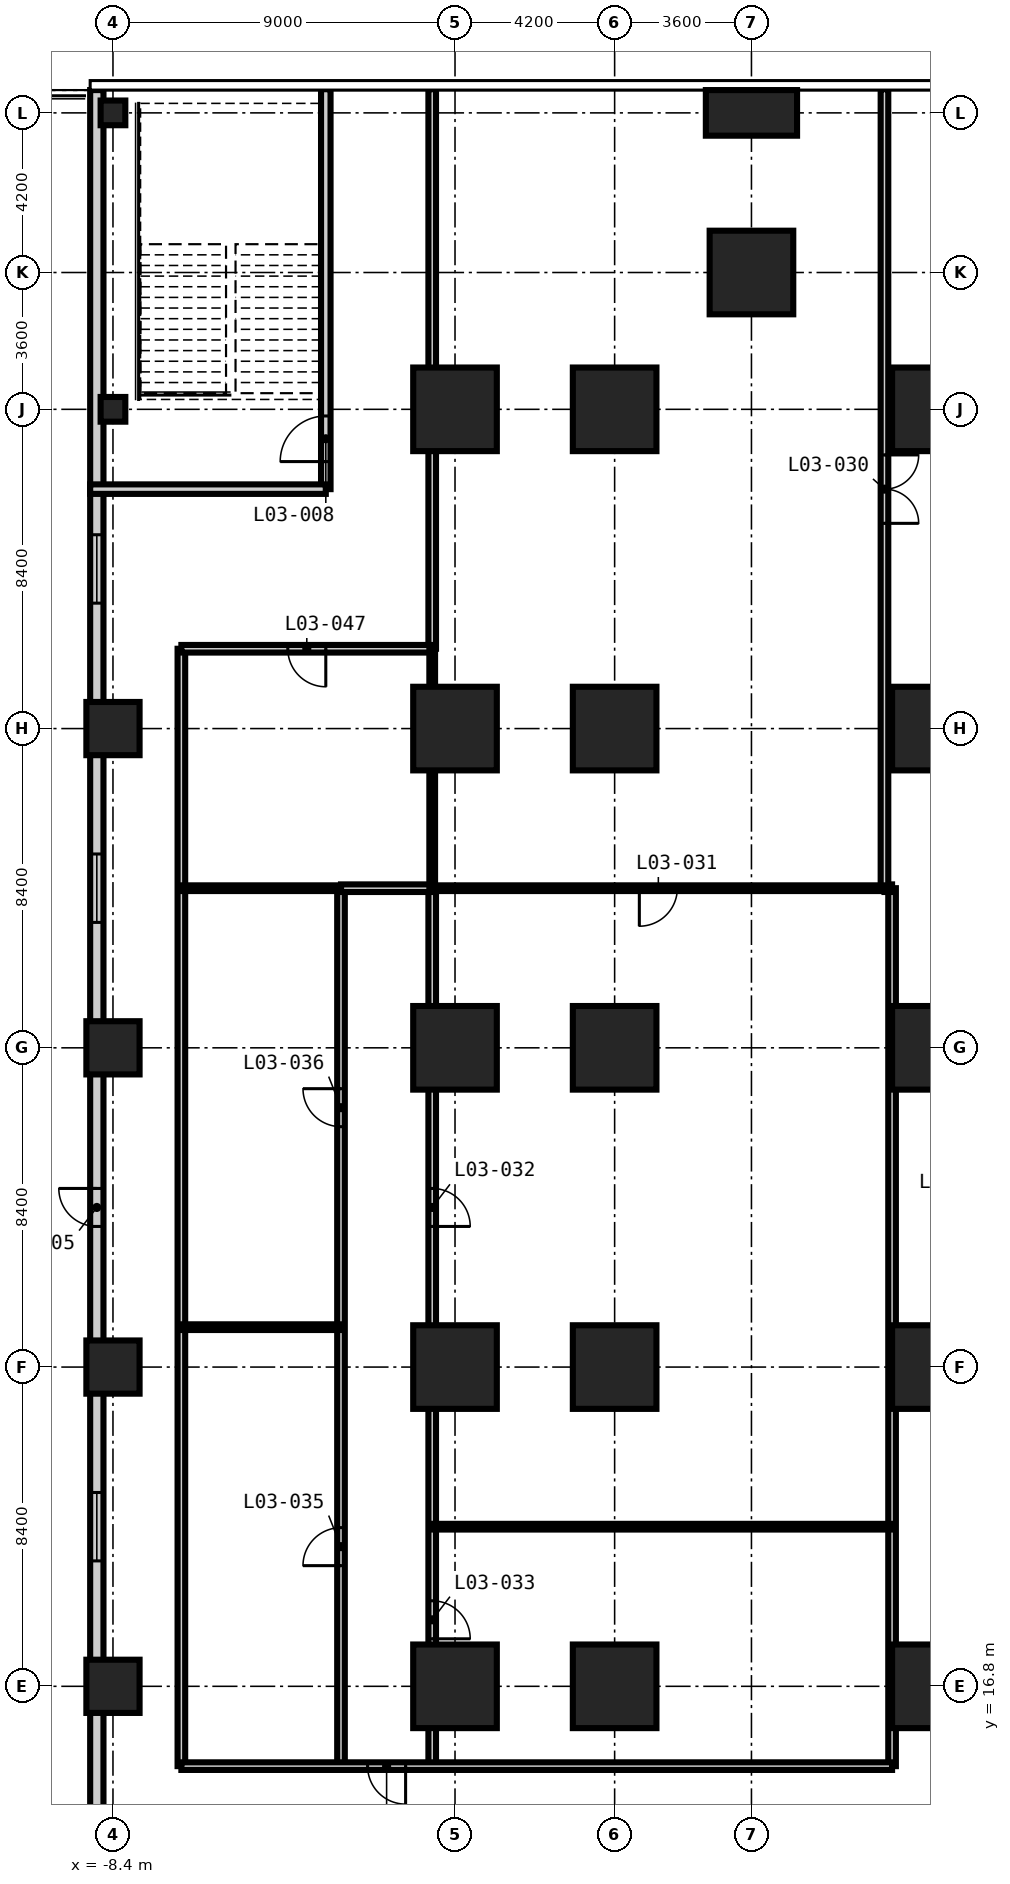
"""IFC4 building model, lengths in metres.
Left out: names, types, materials, properties, quantities, classifications, styles, units other than length and angle.
Written with IfcOpenShell. Run it as: python <this file> out.ifc"""

import sys

from ifc_helpers import new_model, si_unit, direction, frame, frame_2d, origin, origin_2d, place, context, subcontext, project, spatial, rectangle, extrude, element, fill, save


model = new_model("IFC4")
c1 = context("Model", 3, precision=1e-05, world=origin(), true_north=direction((0.0, 1.0)))
c2 = subcontext(c1, "Body", "Model", "MODEL_VIEW")
j1 = project(units=[si_unit("LENGTHUNIT", "METRE"), si_unit("PLANEANGLEUNIT", "RADIAN")], contexts=[c1])
p1 = place(None, origin())
s1 = spatial("IfcSite", under=j1, at=p1, CompositionType="ELEMENT")
p2 = place(p1, origin())
s2 = spatial("IfcBuilding", under=s1, at=p2, CompositionType="ELEMENT")
p3 = place(p2, frame((0.0, 0.0, 17.0)))
s3 = spatial("IfcBuildingStorey", under=s2, at=p3, CompositionType="ELEMENT", Elevation=17.0)
for number, where, z_axis, x_axis in (
    (1, (0.6, 16.8, -0.3), (0.0, 0.0, 1.0), (1.0, 0.0, 0.0)),
    (2, (0.6, 25.2, -0.3), (0.0, 0.0, 1.0), (1.0, 0.0, 0.0)),
    (3, (0.6, 33.6, -0.3), (0.0, 0.0, 1.0), (1.0, 0.0, 0.0)),
    (4, (0.6, 42.0, -0.3), (0.0, 0.0, 1.0), (1.0, 0.0, 0.0)),
    (5, (0.6, 50.4, -0.3), (0.0, 0.0, 1.0), (1.0, 0.0, 0.0)),
    (6, (4.8, 16.8, -0.3), (0.0, 0.0, 1.0), (1.0, 0.0, 0.0)),
    (7, (4.8, 25.2, -0.3), (0.0, 0.0, 1.0), (1.0, 0.0, 0.0)),
    (8, (4.8, 33.6, -0.3), (0.0, 0.0, 1.0), (1.0, 0.0, 0.0)),
    (9, (4.8, 42.0, -0.3), (0.0, 0.0, 1.0), (1.0, 0.0, 0.0)),
    (10, (4.8, 50.4, -0.3), (0.0, 0.0, 1.0), (1.0, 0.0, 0.0)),
    (11, (8.4, 54.0, -0.3), (0.0, 0.0, 1.0), (1.0, 0.0, 0.0)),
):
    element("IfcColumn", number, at=place(p3, frame(where, z_axis=z_axis, x_axis=x_axis)), inside=s3, PredefinedType="COLUMN", context=c2, shape_type="SweptSolid", body=[
        extrude(rectangle(XDim=2.2, YDim=2.2, at=origin_2d()), origin(), (0.0, 0.0, 1.0), 4.95),
    ])
p4 = place(p3, frame((8.4, 58.2, -0.3), z_axis=(0.0, 0.0, 1.0), x_axis=(1.0, 0.0, 0.0)))
e12 = element("IfcColumn", 12, at=p4, inside=s3, PredefinedType="COLUMN", context=c2, shape_type="SweptSolid", body=[
    extrude(rectangle(XDim=2.4, YDim=1.2, at=origin_2d()), origin(), (0.0, 0.0, 1.0), 4.95),
])
for number, where, z_axis, x_axis in (
    (13, (13.2, 16.8, -0.3), (0.0, 0.0, 1.0), (1.0, 0.0, 0.0)),
    (14, (13.2, 25.2, -0.3), (0.0, 0.0, 1.0), (1.0, 0.0, 0.0)),
    (15, (13.2, 33.6, -0.3), (0.0, 0.0, 1.0), (1.0, 0.0, 0.0)),
    (16, (13.2, 42.0, -0.3), (0.0, 0.0, 1.0), (1.0, 0.0, 0.0)),
    (17, (13.2, 50.4, -0.3), (0.0, 0.0, 1.0), (1.0, 0.0, 0.0)),
):
    element("IfcColumn", number, at=place(p3, frame(where, z_axis=z_axis, x_axis=x_axis)), inside=s3, PredefinedType="COLUMN", context=c2, shape_type="SweptSolid", body=[
        extrude(rectangle(XDim=2.2, YDim=2.2, at=origin_2d()), origin(), (0.0, 0.0, 1.0), 4.95),
    ])
for number, where, z_axis, x_axis in (
    (18, (-8.4, 16.8, -0.3), (0.0, 0.0, 1.0), (1.0, 0.0, 0.0)),
    (19, (-8.4, 25.2, -0.3), (0.0, 0.0, 1.0), (1.0, 0.0, 0.0)),
    (20, (-8.4, 33.6, -0.3), (0.0, 0.0, 1.0), (1.0, 0.0, 0.0)),
    (21, (-8.4, 42.0, -0.3), (0.0, 0.0, 1.0), (1.0, 0.0, 0.0)),
):
    element("IfcColumn", number, at=place(p3, frame(where, z_axis=z_axis, x_axis=x_axis)), inside=s3, PredefinedType="COLUMN", context=c2, shape_type="SweptSolid", body=[
        extrude(rectangle(XDim=1.4, YDim=1.4, at=origin_2d()), origin(), (0.0, 0.0, 1.0), 4.95),
    ])
for number, where, z_axis, x_axis in (
    (22, (-8.4, 50.4, -0.3), (0.0, 0.0, 1.0), (1.0, 0.0, 0.0)),
    (23, (-8.4, 58.2, -0.3), (0.0, 0.0, 1.0), (1.0, 0.0, 0.0)),
):
    element("IfcColumn", number, at=place(p3, frame(where, z_axis=z_axis, x_axis=x_axis)), inside=s3, PredefinedType="COLUMN", context=c2, shape_type="SweptSolid", body=[
        extrude(rectangle(XDim=0.65, YDim=0.65, at=origin_2d()), origin(), (0.0, 0.0, 1.0), 4.95),
    ])
p5 = place(p3, frame((-8.825, 58.8, 0.0), z_axis=(0.0, 0.0, 1.0), x_axis=(0.0, -1.0, 0.0)))
e24 = element("IfcWall", 24, at=p5, inside=s3, PredefinedType="SOLIDWALL", context=c2, shape_type="SweptSolid", body=[
    extrude(rectangle(XDim=58.8, YDim=0.35, at=frame_2d((29.4, 0.0))), origin(), (0.0, 0.0, 1.0), 4.65),
])
p6 = place(p5, frame((28.9, 0.0, 0.0)))
e25 = element("IfcOpeningElement", 25, at=p6, cuts=e24, PredefinedType="OPENING", context=c2, shape_type="SweptSolid", body=[
    extrude(rectangle(XDim=1.0, YDim=2.4, at=frame_2d((0.5, 1.2))), frame((0.0, 0.185, 0.0), z_axis=(0.0, -1.0, 0.0), x_axis=(1.0, 0.0, 0.0)), (0.0, 0.0, 1.0), 0.37),
])
p7 = place(p5, frame((45.3, 0.0, 0.6)))
e26 = element("IfcOpeningElement", 26, at=p7, cuts=e24, PredefinedType="OPENING", context=c2, shape_type="SweptSolid", body=[
    extrude(rectangle(XDim=1.8, YDim=2.1, at=frame_2d((0.9, 1.05))), frame((0.0, 0.185, 0.0), z_axis=(0.0, -1.0, 0.0), x_axis=(1.0, 0.0, 0.0)), (0.0, 0.0, 1.0), 0.37),
])
p8 = place(p5, frame((36.9, 0.0, 0.6)))
e27 = element("IfcOpeningElement", 27, at=p8, cuts=e24, PredefinedType="OPENING", context=c2, shape_type="SweptSolid", body=[
    extrude(rectangle(XDim=1.8, YDim=2.1, at=frame_2d((0.9, 1.05))), frame((0.0, 0.185, 0.0), z_axis=(0.0, -1.0, 0.0), x_axis=(1.0, 0.0, 0.0)), (0.0, 0.0, 1.0), 0.37),
])
p9 = place(p5, frame((20.1, 0.0, 0.6)))
e28 = element("IfcOpeningElement", 28, at=p9, cuts=e24, PredefinedType="OPENING", context=c2, shape_type="SweptSolid", body=[
    extrude(rectangle(XDim=1.8, YDim=2.1, at=frame_2d((0.9, 1.05))), frame((0.0, 0.185, 0.0), z_axis=(0.0, -1.0, 0.0), x_axis=(1.0, 0.0, 0.0)), (0.0, 0.0, 1.0), 0.37),
])
p10 = place(p5, frame((11.7, 0.0, 0.6)))
e29 = element("IfcOpeningElement", 29, at=p10, cuts=e24, PredefinedType="OPENING", context=c2, shape_type="SweptSolid", body=[
    extrude(rectangle(XDim=1.8, YDim=2.1, at=frame_2d((0.9, 1.05))), frame((0.0, 0.185, 0.0), z_axis=(0.0, -1.0, 0.0), x_axis=(1.0, 0.0, 0.0)), (0.0, 0.0, 1.0), 0.37),
])
p11 = place(p3, frame((-6.6, 14.7, 0.0), z_axis=(0.0, 0.0, 1.0), x_axis=(0.0, 1.0, 0.0)))
e30 = element("IfcWall", 30, at=p11, inside=s3, PredefinedType="PARTITIONING", context=c2, shape_type="SweptSolid", body=[
    extrude(rectangle(XDim=29.4, YDim=0.2, at=frame_2d((14.7, 0.0))), origin(), (0.0, 0.0, 1.0), 4.65),
])
p12 = place(p3, frame((-2.4, 14.7, 0.0), z_axis=(0.0, 0.0, 1.0), x_axis=(0.0, 1.0, 0.0)))
e31 = element("IfcWall", 31, at=p12, inside=s3, PredefinedType="PARTITIONING", context=c2, shape_type="SweptSolid", body=[
    extrude(rectangle(XDim=23.1, YDim=0.2, at=frame_2d((11.55, 0.0))), origin(), (0.0, 0.0, 1.0), 4.65),
])
p13 = place(p12, frame((5.275, 0.0, 0.0)))
e32 = element("IfcOpeningElement", 32, at=p13, cuts=e31, PredefinedType="OPENING", context=c2, shape_type="SweptSolid", body=[
    extrude(rectangle(XDim=1.0, YDim=2.1, at=frame_2d((0.5, 1.05))), frame((0.0, 0.11, 0.0), z_axis=(0.0, -1.0, 0.0), x_axis=(1.0, 0.0, 0.0)), (0.0, 0.0, 1.0), 0.22),
])
p14 = place(p12, frame((16.825, 0.0, 0.0)))
e33 = element("IfcOpeningElement", 33, at=p14, cuts=e31, PredefinedType="OPENING", context=c2, shape_type="SweptSolid", body=[
    extrude(rectangle(XDim=1.0, YDim=2.1, at=frame_2d((0.5, 1.05))), frame((0.0, 0.11, 0.0), z_axis=(0.0, -1.0, 0.0), x_axis=(1.0, 0.0, 0.0)), (0.0, 0.0, 1.0), 0.22),
])
p15 = place(p3, frame((0.0, 14.7, 0.0), z_axis=(0.0, 0.0, 1.0), x_axis=(0.0, 1.0, 0.0)))
e34 = element("IfcWall", 34, at=p15, inside=s3, PredefinedType="PARTITIONING", context=c2, shape_type="SweptSolid", body=[
    extrude(rectangle(XDim=23.1, YDim=0.2, at=frame_2d((11.55, 0.0))), origin(), (0.0, 0.0, 1.0), 4.65),
])
p16 = place(p15, frame((14.2, 0.0, 0.0)))
e35 = element("IfcOpeningElement", 35, at=p16, cuts=e34, PredefinedType="OPENING", context=c2, shape_type="SweptSolid", body=[
    extrude(rectangle(XDim=1.0, YDim=2.1, at=frame_2d((0.5, 1.05))), frame((0.0, 0.11, 0.0), z_axis=(0.0, -1.0, 0.0), x_axis=(1.0, 0.0, 0.0)), (0.0, 0.0, 1.0), 0.22),
])
p17 = place(p15, frame((3.35, 0.0, 0.0)))
e36 = element("IfcOpeningElement", 36, at=p17, cuts=e34, PredefinedType="OPENING", context=c2, shape_type="SweptSolid", body=[
    extrude(rectangle(XDim=1.0, YDim=2.1, at=frame_2d((0.5, 1.05))), frame((0.0, 0.11, 0.0), z_axis=(0.0, -1.0, 0.0), x_axis=(1.0, 0.0, 0.0)), (0.0, 0.0, 1.0), 0.22),
])
p18 = place(p3, frame((0.0, 44.1, 0.0), z_axis=(0.0, 0.0, 1.0), x_axis=(0.0, 1.0, 0.0)))
e37 = element("IfcWall", 37, at=p18, inside=s3, PredefinedType="PARTITIONING", context=c2, shape_type="SweptSolid", body=[
    extrude(rectangle(XDim=14.723, YDim=0.2, at=frame_2d((7.361, 0.0))), origin(), (0.0, 0.0, 1.0), 4.65),
])
p19 = place(p3, frame((12.1, 14.7, 0.0), z_axis=(0.0, 0.0, 1.0), x_axis=(0.0, 1.0, 0.0)))
e38 = element("IfcWall", 38, at=p19, inside=s3, PredefinedType="PARTITIONING", context=c2, shape_type="SweptSolid", body=[
    extrude(rectangle(XDim=23.1, YDim=0.2, at=frame_2d((11.55, 0.0))), origin(), (0.0, 0.0, 1.0), 4.65),
])
p20 = place(p3, frame((-6.6, 14.7, 0.0), z_axis=(0.0, 0.0, 1.0), x_axis=(1.0, 0.0, 0.0)))
e39 = element("IfcWall", 39, at=p20, inside=s3, PredefinedType="PARTITIONING", context=c2, shape_type="SweptSolid", body=[
    extrude(rectangle(XDim=18.7, YDim=0.2, at=frame_2d((9.35, 0.0))), origin(), (0.0, 0.0, 1.0), 4.65),
])
p21 = place(p20, frame((4.9, 0.0, 0.0)))
e40 = element("IfcOpeningElement", 40, at=p21, cuts=e39, PredefinedType="OPENING", context=c2, shape_type="SweptSolid", body=[
    extrude(rectangle(XDim=1.0, YDim=2.1, at=frame_2d((0.5, 1.05))), frame((0.0, 0.11, 0.0), z_axis=(0.0, -1.0, 0.0), x_axis=(1.0, 0.0, 0.0)), (0.0, 0.0, 1.0), 0.22),
])
p22 = place(p3, frame((-2.4, 37.8, 0.0), z_axis=(0.0, 0.0, 1.0), x_axis=(1.0, 0.0, 0.0)))
e41 = element("IfcWall", 41, at=p22, inside=s3, PredefinedType="PARTITIONING", context=c2, shape_type="SweptSolid", body=[
    extrude(rectangle(XDim=2.4, YDim=0.2, at=frame_2d((1.2, 0.0))), origin(), (0.0, 0.0, 1.0), 4.65),
])
p23 = place(p3, frame((11.9, 37.8, 0.0), z_axis=(0.0, 0.0, 1.0), x_axis=(1.0, 0.0, 0.0)))
e42 = element("IfcWall", 42, at=p23, inside=s3, PredefinedType="PARTITIONING", context=c2, shape_type="SweptSolid", body=[
    extrude(rectangle(XDim=0.2, YDim=0.2, at=frame_2d((0.1, 0.0))), origin(), (0.0, 0.0, 1.0), 4.65),
])
p24 = place(p3, frame((-6.6, 44.1, 0.0), z_axis=(0.0, 0.0, 1.0), x_axis=(1.0, 0.0, 0.0)))
e43 = element("IfcWall", 43, at=p24, inside=s3, PredefinedType="PARTITIONING", context=c2, shape_type="SweptSolid", body=[
    extrude(rectangle(XDim=6.6, YDim=0.2, at=frame_2d((3.3, 0.0))), origin(), (0.0, 0.0, 1.0), 4.65),
])
p25 = place(p24, frame((2.8, 0.0, 0.0)))
e44 = element("IfcOpeningElement", 44, at=p25, cuts=e43, PredefinedType="OPENING", context=c2, shape_type="SweptSolid", body=[
    extrude(rectangle(XDim=1.0, YDim=2.1, at=frame_2d((0.5, 1.05))), frame((0.0, 0.11, 0.0), z_axis=(0.0, -1.0, 0.0), x_axis=(1.0, 0.0, 0.0)), (0.0, 0.0, 1.0), 0.22),
])
p26 = place(p3, frame((11.9, 58.823, 0.0), z_axis=(0.0, 0.0, 1.0), x_axis=(0.0, -1.0, 0.0)))
e45 = element("IfcWall", 45, at=p26, inside=s3, PredefinedType="PARTITIONING", context=c2, shape_type="SweptSolid", body=[
    extrude(rectangle(XDim=21.023, YDim=0.2, at=frame_2d((10.511, 0.0))), origin(), (0.0, 0.0, 1.0), 4.65),
])
p27 = place(p26, frame((9.623, 0.0, 0.0)))
e46 = element("IfcOpeningElement", 46, at=p27, cuts=e45, PredefinedType="OPENING", context=c2, shape_type="SweptSolid", body=[
    extrude(rectangle(XDim=1.8, YDim=2.4, at=frame_2d((0.9, 1.2))), frame((0.0, 0.11, 0.0), z_axis=(0.0, -1.0, 0.0), x_axis=(1.0, 0.0, 0.0)), (0.0, 0.0, 1.0), 0.22),
])
p28 = place(p3, frame((0.0, 37.8, 0.0), z_axis=(0.0, 0.0, 1.0), x_axis=(0.0, 1.0, 0.0)))
e47 = element("IfcWall", 47, at=p28, inside=s3, PredefinedType="PARTITIONING", context=c2, shape_type="SweptSolid", body=[
    extrude(rectangle(XDim=6.3, YDim=0.15, at=frame_2d((3.15, 0.0))), origin(), (0.0, 0.0, 1.0), 4.65),
])
p29 = place(p3, frame((0.0, 21.0, 0.0), z_axis=(0.0, 0.0, 1.0), x_axis=(1.0, 0.0, 0.0)))
e48 = element("IfcWall", 48, at=p29, inside=s3, PredefinedType="PARTITIONING", context=c2, shape_type="SweptSolid", body=[
    extrude(rectangle(XDim=12.1, YDim=0.15, at=frame_2d((6.05, 0.0))), origin(), (0.0, 0.0, 1.0), 4.65),
])
for number, where, z_axis, x_axis in (
    (49, (-6.6, 26.25, 0.0), (0.0, 0.0, 1.0), (1.0, 0.0, 0.0)),
    (50, (-6.6, 37.8, 0.0), (0.0, 0.0, 1.0), (1.0, 0.0, 0.0)),
):
    element("IfcWall", number, at=place(p3, frame(where, z_axis=z_axis, x_axis=x_axis)), inside=s3, PredefinedType="PARTITIONING", context=c2, shape_type="SweptSolid", body=[
        extrude(rectangle(XDim=4.2, YDim=0.15, at=frame_2d((2.1, 0.0))), origin(), (0.0, 0.0, 1.0), 4.65),
    ])
p30 = place(p3, frame((0.0, 37.8, 0.0), z_axis=(0.0, 0.0, 1.0), x_axis=(1.0, 0.0, 0.0)))
e51 = element("IfcWall", 51, at=p30, inside=s3, PredefinedType="PARTITIONING", context=c2, shape_type="SweptSolid", body=[
    extrude(rectangle(XDim=11.9, YDim=0.15, at=frame_2d((5.95, 0.0))), origin(), (0.0, 0.0, 1.0), 4.65),
])
p31 = place(p30, frame((5.45, 0.0, 0.0)))
e52 = element("IfcOpeningElement", 52, at=p31, cuts=e51, PredefinedType="OPENING", context=c2, shape_type="SweptSolid", body=[
    extrude(rectangle(XDim=1.0, YDim=2.1, at=frame_2d((0.5, 1.05))), frame((0.0, 0.085, 0.0), z_axis=(0.0, -1.0, 0.0), x_axis=(1.0, 0.0, 0.0)), (0.0, 0.0, 1.0), 0.17),
])
p32 = place(p3, frame((-2.8, 48.3, 0.0), z_axis=(0.0, 0.0, 1.0), x_axis=(0.0, 1.0, 0.0)))
e53 = element("IfcWall", 53, at=p32, inside=s3, PredefinedType="PARTITIONING", context=c2, shape_type="SweptSolid", body=[
    extrude(rectangle(XDim=10.523, YDim=0.25, at=frame_2d((5.261, 0.0))), origin(), (0.0, 0.0, 1.0), 4.65),
])
p33 = place(p32, frame((0.725, 0.0, 0.0)))
e54 = element("IfcOpeningElement", 54, at=p33, cuts=e53, PredefinedType="OPENING", context=c2, shape_type="SweptSolid", body=[
    extrude(rectangle(XDim=1.2, YDim=2.2, at=frame_2d((0.6, 1.1))), frame((0.0, 0.135, 0.0), z_axis=(0.0, -1.0, 0.0), x_axis=(1.0, 0.0, 0.0)), (0.0, 0.0, 1.0), 0.27),
])
p34 = place(p3, frame((-9.0, 48.3, 0.0), z_axis=(0.0, 0.0, 1.0), x_axis=(1.0, 0.0, 0.0)))
e55 = element("IfcWall", 55, at=p34, inside=s3, PredefinedType="PARTITIONING", context=c2, shape_type="SweptSolid", body=[
    extrude(rectangle(XDim=6.2, YDim=0.25, at=frame_2d((3.1, 0.0))), origin(), (0.0, 0.0, 1.0), 4.65),
])
p35 = place(p6, frame((1.0, 0.0, 0.0), z_axis=(0.0, 0.0, 1.0), x_axis=(-1.0, 0.0, 0.0)))
e56 = element("IfcDoor", 56, at=p35, inside=s3, OperationType="SINGLE_SWING_RIGHT", PredefinedType="DOOR", context=c2, shape_type="SweptSolid", body=[
    extrude(rectangle(XDim=1.0, YDim=2.4, at=frame_2d((0.5, 1.2))), frame((0.0, 0.025, 0.0), z_axis=(0.0, -1.0, 0.0), x_axis=(1.0, 0.0, 0.0)), (0.0, 0.0, 1.0), 0.05),
])
fill(e25, e56)
p36 = place(p8, origin())
e57 = element("IfcWindow", 57, at=p36, inside=s3, PartitioningType="SINGLE_PANEL", PredefinedType="WINDOW", context=c2, shape_type="SweptSolid", body=[
    extrude(rectangle(XDim=1.8, YDim=2.1, at=frame_2d((0.9, 1.05))), frame((0.0, 0.03, 0.0), z_axis=(0.0, -1.0, 0.0), x_axis=(1.0, 0.0, 0.0)), (0.0, 0.0, 1.0), 0.06),
])
fill(e27, e57)
p37 = place(p9, origin())
e58 = element("IfcWindow", 58, at=p37, inside=s3, PartitioningType="SINGLE_PANEL", PredefinedType="WINDOW", context=c2, shape_type="SweptSolid", body=[
    extrude(rectangle(XDim=1.8, YDim=2.1, at=frame_2d((0.9, 1.05))), frame((0.0, 0.03, 0.0), z_axis=(0.0, -1.0, 0.0), x_axis=(1.0, 0.0, 0.0)), (0.0, 0.0, 1.0), 0.06),
])
fill(e28, e58)
p38 = place(p10, origin())
e59 = element("IfcWindow", 59, at=p38, inside=s3, PartitioningType="SINGLE_PANEL", PredefinedType="WINDOW", context=c2, shape_type="SweptSolid", body=[
    extrude(rectangle(XDim=1.8, YDim=2.1, at=frame_2d((0.9, 1.05))), frame((0.0, 0.03, 0.0), z_axis=(0.0, -1.0, 0.0), x_axis=(1.0, 0.0, 0.0)), (0.0, 0.0, 1.0), 0.06),
])
fill(e29, e59)
p39 = place(p33, origin())
e60 = element("IfcDoor", 60, at=p39, inside=s3, OperationType="SINGLE_SWING_LEFT", PredefinedType="DOOR", context=c2, shape_type="SweptSolid", body=[
    extrude(rectangle(XDim=1.2, YDim=2.2, at=frame_2d((0.6, 1.1))), frame((0.0, 0.025, 0.0), z_axis=(0.0, -1.0, 0.0), x_axis=(1.0, 0.0, 0.0)), (0.0, 0.0, 1.0), 0.05),
])
fill(e54, e60)
p40 = place(p27, origin())
e61 = element("IfcDoor", 61, at=p40, inside=s3, OperationType="DOUBLE_DOOR_DOUBLE_SWING", PredefinedType="DOOR", context=c2, shape_type="SweptSolid", body=[
    extrude(rectangle(XDim=1.8, YDim=2.4, at=frame_2d((0.9, 1.2))), frame((0.0, 0.025, 0.0), z_axis=(0.0, -1.0, 0.0), x_axis=(1.0, 0.0, 0.0)), (0.0, 0.0, 1.0), 0.05),
])
fill(e46, e61)
p41 = place(p31, frame((1.0, 0.0, 0.0), z_axis=(0.0, 0.0, 1.0), x_axis=(-1.0, 0.0, 0.0)))
e62 = element("IfcDoor", 62, at=p41, inside=s3, OperationType="SINGLE_SWING_RIGHT", PredefinedType="DOOR", context=c2, shape_type="SweptSolid", body=[
    extrude(rectangle(XDim=1.0, YDim=2.1, at=frame_2d((0.5, 1.05))), frame((0.0, 0.025, 0.0), z_axis=(0.0, -1.0, 0.0), x_axis=(1.0, 0.0, 0.0)), (0.0, 0.0, 1.0), 0.05),
])
fill(e52, e62)
p42 = place(p16, frame((1.0, 0.0, 0.0), z_axis=(0.0, 0.0, 1.0), x_axis=(-1.0, 0.0, 0.0)))
e63 = element("IfcDoor", 63, at=p42, inside=s3, OperationType="SINGLE_SWING_RIGHT", PredefinedType="DOOR", context=c2, shape_type="SweptSolid", body=[
    extrude(rectangle(XDim=1.0, YDim=2.1, at=frame_2d((0.5, 1.05))), frame((0.0, 0.025, 0.0), z_axis=(0.0, -1.0, 0.0), x_axis=(1.0, 0.0, 0.0)), (0.0, 0.0, 1.0), 0.05),
])
fill(e35, e63)
p43 = place(p17, frame((1.0, 0.0, 0.0), z_axis=(0.0, 0.0, 1.0), x_axis=(-1.0, 0.0, 0.0)))
e64 = element("IfcDoor", 64, at=p43, inside=s3, OperationType="SINGLE_SWING_RIGHT", PredefinedType="DOOR", context=c2, shape_type="SweptSolid", body=[
    extrude(rectangle(XDim=1.0, YDim=2.1, at=frame_2d((0.5, 1.05))), frame((0.0, 0.025, 0.0), z_axis=(0.0, -1.0, 0.0), x_axis=(1.0, 0.0, 0.0)), (0.0, 0.0, 1.0), 0.05),
])
fill(e36, e64)
p44 = place(p21, frame((1.0, 0.0, 0.0), z_axis=(0.0, 0.0, 1.0), x_axis=(-1.0, 0.0, 0.0)))
e65 = element("IfcDoor", 65, at=p44, inside=s3, OperationType="SINGLE_SWING_LEFT", PredefinedType="DOOR", context=c2, shape_type="SweptSolid", body=[
    extrude(rectangle(XDim=1.0, YDim=2.1, at=frame_2d((0.5, 1.05))), frame((0.0, 0.025, 0.0), z_axis=(0.0, -1.0, 0.0), x_axis=(1.0, 0.0, 0.0)), (0.0, 0.0, 1.0), 0.05),
])
fill(e40, e65)
p45 = place(p13, origin())
e66 = element("IfcDoor", 66, at=p45, inside=s3, OperationType="SINGLE_SWING_LEFT", PredefinedType="DOOR", context=c2, shape_type="SweptSolid", body=[
    extrude(rectangle(XDim=1.0, YDim=2.1, at=frame_2d((0.5, 1.05))), frame((0.0, 0.025, 0.0), z_axis=(0.0, -1.0, 0.0), x_axis=(1.0, 0.0, 0.0)), (0.0, 0.0, 1.0), 0.05),
])
fill(e32, e66)
p46 = place(p14, origin())
e67 = element("IfcDoor", 67, at=p46, inside=s3, OperationType="SINGLE_SWING_RIGHT", PredefinedType="DOOR", context=c2, shape_type="SweptSolid", body=[
    extrude(rectangle(XDim=1.0, YDim=2.1, at=frame_2d((0.5, 1.05))), frame((0.0, 0.025, 0.0), z_axis=(0.0, -1.0, 0.0), x_axis=(1.0, 0.0, 0.0)), (0.0, 0.0, 1.0), 0.05),
])
fill(e33, e67)
p47 = place(p25, frame((1.0, 0.0, 0.0), z_axis=(0.0, 0.0, 1.0), x_axis=(-1.0, 0.0, 0.0)))
e68 = element("IfcDoor", 68, at=p47, inside=s3, OperationType="SINGLE_SWING_LEFT", PredefinedType="DOOR", context=c2, shape_type="SweptSolid", body=[
    extrude(rectangle(XDim=1.0, YDim=2.1, at=frame_2d((0.5, 1.05))), frame((0.0, 0.025, 0.0), z_axis=(0.0, -1.0, 0.0), x_axis=(1.0, 0.0, 0.0)), (0.0, 0.0, 1.0), 0.05),
])
fill(e44, e68)
save(model, sys.argv[1])
